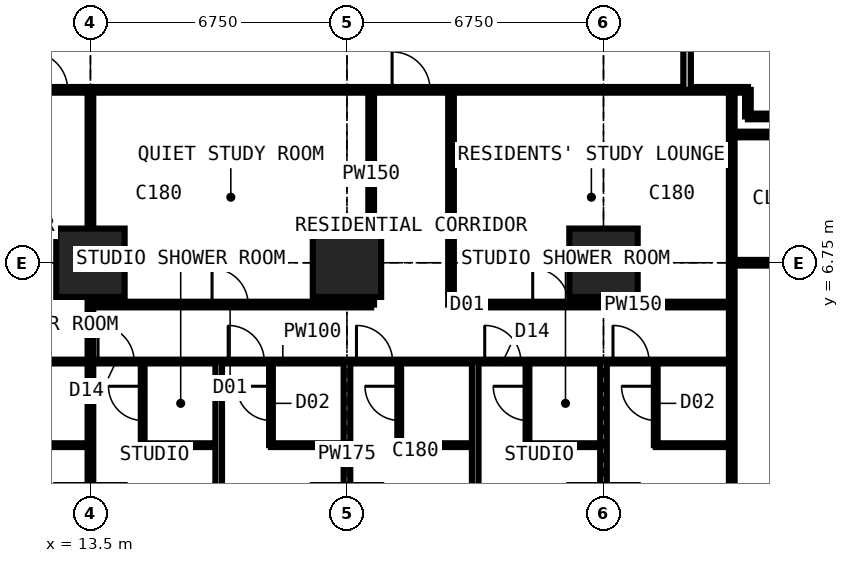
"""IFC4 building model, lengths in metres.
Left out: names, types, materials, properties, quantities, classifications, styles, units other than length and angle.
Written with IfcOpenShell. Run it as: python <this file> out.ifc"""

import sys

from ifc_helpers import new_model, si_unit, direction, frame, frame_2d, origin, origin_2d, place, context, subcontext, project, spatial, rectangle, extrude, element, fill, save


model = new_model("IFC4")
c1 = context("Model", 3, precision=1e-05, world=origin(), true_north=direction((0.0, 1.0)))
c2 = subcontext(c1, "Body", "Model", "MODEL_VIEW")
j1 = project(units=[si_unit("LENGTHUNIT", "METRE"), si_unit("PLANEANGLEUNIT", "RADIAN")], contexts=[c1])
p1 = place(None, origin())
s1 = spatial("IfcSite", under=j1, at=p1, CompositionType="ELEMENT")
p2 = place(p1, origin())
s2 = spatial("IfcBuilding", under=s1, at=p2, CompositionType="ELEMENT")
p3 = place(p2, frame((0.0, 0.0, 105.3)))
s3 = spatial("IfcBuildingStorey", under=s2, at=p3, CompositionType="ELEMENT", Elevation=105.3)
for number, where, z_axis, x_axis in (
    (1, (13.5, 6.75, 0.0), (0.0, 0.0, 1.0), (1.0, 0.0, 0.0)),
    (2, (20.25, 6.75, 0.0), (0.0, 0.0, 1.0), (1.0, 0.0, 0.0)),
    (3, (27.0, 6.75, 0.0), (0.0, 0.0, 1.0), (1.0, 0.0, 0.0)),
):
    element("IfcColumn", number, at=place(p3, frame(where, z_axis=z_axis, x_axis=x_axis)), inside=s3, PredefinedType="COLUMN", context=c2, shape_type="SweptSolid", body=[
        extrude(rectangle(XDim=1.8, YDim=1.8, at=origin_2d()), origin(), (0.0, 0.0, 1.0), 3.6),
    ])
p4 = place(p3, frame((6.75, 4.15, 0.0), z_axis=(0.0, 0.0, 1.0), x_axis=(1.0, 0.0, 0.0)))
e4 = element("IfcWall", 4, at=p4, inside=s3, PredefinedType="PARTITIONING", context=c2, shape_type="SweptSolid", body=[
    extrude(rectangle(XDim=23.625, YDim=0.1, at=frame_2d((11.812, 0.0))), origin(), (0.0, 0.0, 1.0), 3.375),
])
p5 = place(p4, frame((0.2, 0.0, 0.0)))
e5 = element("IfcOpeningElement", 5, at=p5, cuts=e4, PredefinedType="OPENING", context=c2, shape_type="SweptSolid", body=[
    extrude(rectangle(XDim=0.95, YDim=2.2, at=frame_2d((0.475, 1.1))), frame((0.0, 0.06, 0.0), z_axis=(0.0, -1.0, 0.0), x_axis=(1.0, 0.0, 0.0)), (0.0, 0.0, 1.0), 0.12),
])
p6 = place(p4, frame((3.625, 0.0, 0.0)))
e6 = element("IfcOpeningElement", 6, at=p6, cuts=e4, PredefinedType="OPENING", context=c2, shape_type="SweptSolid", body=[
    extrude(rectangle(XDim=0.95, YDim=2.2, at=frame_2d((0.475, 1.1))), frame((0.0, 0.06, 0.0), z_axis=(0.0, -1.0, 0.0), x_axis=(1.0, 0.0, 0.0)), (0.0, 0.0, 1.0), 0.12),
])
p7 = place(p4, frame((6.95, 0.0, 0.0)))
e7 = element("IfcOpeningElement", 7, at=p7, cuts=e4, PredefinedType="OPENING", context=c2, shape_type="SweptSolid", body=[
    extrude(rectangle(XDim=0.95, YDim=2.2, at=frame_2d((0.475, 1.1))), frame((0.0, 0.06, 0.0), z_axis=(0.0, -1.0, 0.0), x_axis=(1.0, 0.0, 0.0)), (0.0, 0.0, 1.0), 0.12),
])
p8 = place(p4, frame((10.375, 0.0, 0.0)))
e8 = element("IfcOpeningElement", 8, at=p8, cuts=e4, PredefinedType="OPENING", context=c2, shape_type="SweptSolid", body=[
    extrude(rectangle(XDim=0.95, YDim=2.2, at=frame_2d((0.475, 1.1))), frame((0.0, 0.06, 0.0), z_axis=(0.0, -1.0, 0.0), x_axis=(1.0, 0.0, 0.0)), (0.0, 0.0, 1.0), 0.12),
])
p9 = place(p4, frame((13.75, 0.0, 0.0)))
e9 = element("IfcOpeningElement", 9, at=p9, cuts=e4, PredefinedType="OPENING", context=c2, shape_type="SweptSolid", body=[
    extrude(rectangle(XDim=0.95, YDim=2.2, at=frame_2d((0.475, 1.1))), frame((0.0, 0.06, 0.0), z_axis=(0.0, -1.0, 0.0), x_axis=(1.0, 0.0, 0.0)), (0.0, 0.0, 1.0), 0.12),
])
p10 = place(p4, frame((17.125, 0.0, 0.0)))
e10 = element("IfcOpeningElement", 10, at=p10, cuts=e4, PredefinedType="OPENING", context=c2, shape_type="SweptSolid", body=[
    extrude(rectangle(XDim=0.95, YDim=2.2, at=frame_2d((0.475, 1.1))), frame((0.0, 0.06, 0.0), z_axis=(0.0, -1.0, 0.0), x_axis=(1.0, 0.0, 0.0)), (0.0, 0.0, 1.0), 0.12),
])
p11 = place(p4, frame((20.5, 0.0, 0.0)))
e11 = element("IfcOpeningElement", 11, at=p11, cuts=e4, PredefinedType="OPENING", context=c2, shape_type="SweptSolid", body=[
    extrude(rectangle(XDim=0.95, YDim=2.2, at=frame_2d((0.475, 1.1))), frame((0.0, 0.06, 0.0), z_axis=(0.0, -1.0, 0.0), x_axis=(1.0, 0.0, 0.0)), (0.0, 0.0, 1.0), 0.12),
])
p12 = place(p3, frame((10.125, 11.3, 0.0), z_axis=(0.0, 0.0, 1.0), x_axis=(1.0, 0.0, 0.0)))
e12 = element("IfcWall", 12, at=p12, inside=s3, PredefinedType="PARTITIONING", context=c2, shape_type="SweptSolid", body=[
    extrude(rectangle(XDim=20.675, YDim=0.15, at=frame_2d((10.337, 0.0))), origin(), (0.0, 0.0, 1.0), 3.375),
])
p13 = place(p12, frame((1.775, 0.0, 0.0)))
e13 = element("IfcOpeningElement", 13, at=p13, cuts=e12, PredefinedType="OPENING", context=c2, shape_type="SweptSolid", body=[
    extrude(rectangle(XDim=1.0, YDim=2.2, at=frame_2d((0.5, 1.1))), frame((0.0, 0.085, 0.0), z_axis=(0.0, -1.0, 0.0), x_axis=(1.0, 0.0, 0.0)), (0.0, 0.0, 1.0), 0.17),
])
p14 = place(p12, frame((11.312, 0.0, 0.0)))
e14 = element("IfcOpeningElement", 14, at=p14, cuts=e12, PredefinedType="OPENING", context=c2, shape_type="SweptSolid", body=[
    extrude(rectangle(XDim=1.0, YDim=2.2, at=frame_2d((0.5, 1.1))), frame((0.0, 0.085, 0.0), z_axis=(0.0, -1.0, 0.0), x_axis=(1.0, 0.0, 0.0)), (0.0, 0.0, 1.0), 0.17),
])
p15 = place(p3, frame((11.5, 1.95, 0.0), z_axis=(0.0, 0.0, 1.0), x_axis=(1.0, 0.0, 0.0)))
e15 = element("IfcWall", 15, at=p15, inside=s3, PredefinedType="PARTITIONING", context=c2, shape_type="SweptSolid", body=[
    extrude(rectangle(XDim=2.0, YDim=0.1, at=frame_2d((1.0, 0.0))), origin(), (0.0, 0.0, 1.0), 3.375),
])
p16 = place(p3, frame((13.5, -0.734, 0.0), z_axis=(0.0, 0.0, 1.0), x_axis=(0.0, 1.0, 0.0)))
e16 = element("IfcWall", 16, at=p16, inside=s3, PredefinedType="PARTITIONING", context=c2, shape_type="SweptSolid", body=[
    extrude(rectangle(XDim=12.034, YDim=0.15, at=frame_2d((6.017, 0.0))), origin(), (0.0, 0.0, 1.0), 2.61),
])
p17 = place(p3, frame((13.5, 5.65, 0.0), z_axis=(0.0, 0.0, 1.0), x_axis=(1.0, 0.0, 0.0)))
e17 = element("IfcWall", 17, at=p17, inside=s3, PredefinedType="PARTITIONING", context=c2, shape_type="SweptSolid", body=[
    extrude(rectangle(XDim=7.387, YDim=0.15, at=frame_2d((3.694, 0.0))), origin(), (0.0, 0.0, 1.0), 3.375),
])
p18 = place(p17, frame((3.2, 0.0, 0.0)))
e18 = element("IfcOpeningElement", 18, at=p18, cuts=e17, PredefinedType="OPENING", context=c2, shape_type="SweptSolid", body=[
    extrude(rectangle(XDim=0.95, YDim=2.2, at=frame_2d((0.475, 1.1))), frame((0.0, 0.085, 0.0), z_axis=(0.0, -1.0, 0.0), x_axis=(1.0, 0.0, 0.0)), (0.0, 0.0, 1.0), 0.17),
])
p19 = place(p3, frame((14.875, 1.95, 0.0), z_axis=(0.0, 0.0, 1.0), x_axis=(0.0, 1.0, 0.0)))
e19 = element("IfcWall", 19, at=p19, inside=s3, PredefinedType="PARTITIONING", context=c2, shape_type="SweptSolid", body=[
    extrude(rectangle(XDim=2.2, YDim=0.1, at=frame_2d((1.1, 0.0))), origin(), (0.0, 0.0, 1.0), 3.375),
])
p20 = place(p19, frame((0.65, 0.0, 0.0)))
e20 = element("IfcOpeningElement", 20, at=p20, cuts=e19, PredefinedType="OPENING", context=c2, shape_type="SweptSolid", body=[
    extrude(rectangle(XDim=0.9, YDim=2.2, at=frame_2d((0.45, 1.1))), frame((0.0, 0.06, 0.0), z_axis=(0.0, -1.0, 0.0), x_axis=(1.0, 0.0, 0.0)), (0.0, 0.0, 1.0), 0.12),
])
p21 = place(p3, frame((14.875, 1.95, 0.0), z_axis=(0.0, 0.0, 1.0), x_axis=(1.0, 0.0, 0.0)))
e21 = element("IfcWall", 21, at=p21, inside=s3, PredefinedType="PARTITIONING", context=c2, shape_type="SweptSolid", body=[
    extrude(rectangle(XDim=2.0, YDim=0.1, at=frame_2d((1.0, 0.0))), origin(), (0.0, 0.0, 1.0), 3.375),
])
p22 = place(p3, frame((16.875, -0.734, 0.0), z_axis=(0.0, 0.0, 1.0), x_axis=(0.0, 1.0, 0.0)))
e22 = element("IfcWall", 22, at=p22, inside=s3, PredefinedType="PARTITIONING", context=c2, shape_type="SweptSolid", body=[
    extrude(rectangle(XDim=4.884, YDim=0.175, at=frame_2d((2.442, 0.0))), origin(), (0.0, 0.0, 1.0), 3.375),
])
p23 = place(p3, frame((18.25, 1.95, 0.0), z_axis=(0.0, 0.0, 1.0), x_axis=(0.0, 1.0, 0.0)))
e23 = element("IfcWall", 23, at=p23, inside=s3, PredefinedType="PARTITIONING", context=c2, shape_type="SweptSolid", body=[
    extrude(rectangle(XDim=2.2, YDim=0.1, at=frame_2d((1.1, 0.0))), origin(), (0.0, 0.0, 1.0), 3.375),
])
p24 = place(p23, frame((0.65, 0.0, 0.0)))
e24 = element("IfcOpeningElement", 24, at=p24, cuts=e23, PredefinedType="OPENING", context=c2, shape_type="SweptSolid", body=[
    extrude(rectangle(XDim=0.9, YDim=2.2, at=frame_2d((0.45, 1.1))), frame((0.0, 0.06, 0.0), z_axis=(0.0, -1.0, 0.0), x_axis=(1.0, 0.0, 0.0)), (0.0, 0.0, 1.0), 0.12),
])
p25 = place(p3, frame((18.25, 1.95, 0.0), z_axis=(0.0, 0.0, 1.0), x_axis=(1.0, 0.0, 0.0)))
e25 = element("IfcWall", 25, at=p25, inside=s3, PredefinedType="PARTITIONING", context=c2, shape_type="SweptSolid", body=[
    extrude(rectangle(XDim=2.0, YDim=0.1, at=frame_2d((1.0, 0.0))), origin(), (0.0, 0.0, 1.0), 3.375),
])
p26 = place(p3, frame((20.25, -0.734, 0.0), z_axis=(0.0, 0.0, 1.0), x_axis=(0.0, 1.0, 0.0)))
e26 = element("IfcWall", 26, at=p26, inside=s3, PredefinedType="PARTITIONING", context=c2, shape_type="SweptSolid", body=[
    extrude(rectangle(XDim=4.884, YDim=0.175, at=frame_2d((2.442, 0.0))), origin(), (0.0, 0.0, 1.0), 2.61),
])
p27 = place(p3, frame((20.887, 5.65, 0.0), z_axis=(0.0, 0.0, 1.0), x_axis=(0.0, 1.0, 0.0)))
e27 = element("IfcWall", 27, at=p27, inside=s3, PredefinedType="PARTITIONING", context=c2, shape_type="SweptSolid", body=[
    extrude(rectangle(XDim=5.65, YDim=0.15, at=frame_2d((2.825, 0.0))), origin(), (0.0, 0.0, 1.0), 3.375),
])
p28 = place(p3, frame((21.625, 1.95, 0.0), z_axis=(0.0, 0.0, 1.0), x_axis=(0.0, 1.0, 0.0)))
e28 = element("IfcWall", 28, at=p28, inside=s3, PredefinedType="PARTITIONING", context=c2, shape_type="SweptSolid", body=[
    extrude(rectangle(XDim=2.2, YDim=0.1, at=frame_2d((1.1, 0.0))), origin(), (0.0, 0.0, 1.0), 3.375),
])
p29 = place(p28, frame((0.65, 0.0, 0.0)))
e29 = element("IfcOpeningElement", 29, at=p29, cuts=e28, PredefinedType="OPENING", context=c2, shape_type="SweptSolid", body=[
    extrude(rectangle(XDim=0.9, YDim=2.2, at=frame_2d((0.45, 1.1))), frame((0.0, 0.06, 0.0), z_axis=(0.0, -1.0, 0.0), x_axis=(1.0, 0.0, 0.0)), (0.0, 0.0, 1.0), 0.12),
])
p30 = place(p3, frame((21.625, 1.95, 0.0), z_axis=(0.0, 0.0, 1.0), x_axis=(1.0, 0.0, 0.0)))
e30 = element("IfcWall", 30, at=p30, inside=s3, PredefinedType="PARTITIONING", context=c2, shape_type="SweptSolid", body=[
    extrude(rectangle(XDim=2.0, YDim=0.1, at=frame_2d((1.0, 0.0))), origin(), (0.0, 0.0, 1.0), 3.375),
])
p31 = place(p3, frame((22.988, 5.65, 0.0), z_axis=(0.0, 0.0, 1.0), x_axis=(1.0, 0.0, 0.0)))
e31 = element("IfcWall", 31, at=p31, inside=s3, PredefinedType="PARTITIONING", context=c2, shape_type="SweptSolid", body=[
    extrude(rectangle(XDim=7.387, YDim=0.15, at=frame_2d((3.694, 0.0))), origin(), (0.0, 0.0, 1.0), 3.375),
])
p32 = place(p31, frame((2.15, 0.0, 0.0)))
e32 = element("IfcOpeningElement", 32, at=p32, cuts=e31, PredefinedType="OPENING", context=c2, shape_type="SweptSolid", body=[
    extrude(rectangle(XDim=0.95, YDim=2.2, at=frame_2d((0.475, 1.1))), frame((0.0, 0.085, 0.0), z_axis=(0.0, -1.0, 0.0), x_axis=(1.0, 0.0, 0.0)), (0.0, 0.0, 1.0), 0.17),
])
p33 = place(p3, frame((22.988, 5.65, 0.0), z_axis=(0.0, 0.0, 1.0), x_axis=(0.0, 1.0, 0.0)))
e33 = element("IfcWall", 33, at=p33, inside=s3, PredefinedType="PARTITIONING", context=c2, shape_type="SweptSolid", body=[
    extrude(rectangle(XDim=5.65, YDim=0.15, at=frame_2d((2.825, 0.0))), origin(), (0.0, 0.0, 1.0), 3.375),
])
p34 = place(p3, frame((23.625, -0.734, 0.0), z_axis=(0.0, 0.0, 1.0), x_axis=(0.0, 1.0, 0.0)))
e34 = element("IfcWall", 34, at=p34, inside=s3, PredefinedType="PARTITIONING", context=c2, shape_type="SweptSolid", body=[
    extrude(rectangle(XDim=4.884, YDim=0.175, at=frame_2d((2.442, 0.0))), origin(), (0.0, 0.0, 1.0), 3.375),
])
p35 = place(p3, frame((25.0, 1.95, 0.0), z_axis=(0.0, 0.0, 1.0), x_axis=(0.0, 1.0, 0.0)))
e35 = element("IfcWall", 35, at=p35, inside=s3, PredefinedType="PARTITIONING", context=c2, shape_type="SweptSolid", body=[
    extrude(rectangle(XDim=2.2, YDim=0.1, at=frame_2d((1.1, 0.0))), origin(), (0.0, 0.0, 1.0), 3.375),
])
p36 = place(p35, frame((0.65, 0.0, 0.0)))
e36 = element("IfcOpeningElement", 36, at=p36, cuts=e35, PredefinedType="OPENING", context=c2, shape_type="SweptSolid", body=[
    extrude(rectangle(XDim=0.9, YDim=2.2, at=frame_2d((0.45, 1.1))), frame((0.0, 0.06, 0.0), z_axis=(0.0, -1.0, 0.0), x_axis=(1.0, 0.0, 0.0)), (0.0, 0.0, 1.0), 0.12),
])
p37 = place(p3, frame((25.0, 1.95, 0.0), z_axis=(0.0, 0.0, 1.0), x_axis=(1.0, 0.0, 0.0)))
e37 = element("IfcWall", 37, at=p37, inside=s3, PredefinedType="PARTITIONING", context=c2, shape_type="SweptSolid", body=[
    extrude(rectangle(XDim=2.0, YDim=0.1, at=frame_2d((1.0, 0.0))), origin(), (0.0, 0.0, 1.0), 3.375),
])
p38 = place(p3, frame((27.0, -0.734, 0.0), z_axis=(0.0, 0.0, 1.0), x_axis=(0.0, 1.0, 0.0)))
e38 = element("IfcWall", 38, at=p38, inside=s3, PredefinedType="PARTITIONING", context=c2, shape_type="SweptSolid", body=[
    extrude(rectangle(XDim=4.884, YDim=0.175, at=frame_2d((2.442, 0.0))), origin(), (0.0, 0.0, 1.0), 2.61),
])
p39 = place(p3, frame((28.375, 1.95, 0.0), z_axis=(0.0, 0.0, 1.0), x_axis=(0.0, 1.0, 0.0)))
e39 = element("IfcWall", 39, at=p39, inside=s3, PredefinedType="PARTITIONING", context=c2, shape_type="SweptSolid", body=[
    extrude(rectangle(XDim=2.2, YDim=0.1, at=frame_2d((1.1, 0.0))), origin(), (0.0, 0.0, 1.0), 3.375),
])
p40 = place(p39, frame((0.65, 0.0, 0.0)))
e40 = element("IfcOpeningElement", 40, at=p40, cuts=e39, PredefinedType="OPENING", context=c2, shape_type="SweptSolid", body=[
    extrude(rectangle(XDim=0.9, YDim=2.2, at=frame_2d((0.45, 1.1))), frame((0.0, 0.06, 0.0), z_axis=(0.0, -1.0, 0.0), x_axis=(1.0, 0.0, 0.0)), (0.0, 0.0, 1.0), 0.12),
])
p41 = place(p3, frame((28.375, 1.95, 0.0), z_axis=(0.0, 0.0, 1.0), x_axis=(1.0, 0.0, 0.0)))
e41 = element("IfcWall", 41, at=p41, inside=s3, PredefinedType="PARTITIONING", context=c2, shape_type="SweptSolid", body=[
    extrude(rectangle(XDim=2.0, YDim=0.1, at=frame_2d((1.0, 0.0))), origin(), (0.0, 0.0, 1.0), 3.375),
])
p42 = place(p3, frame((29.2, 11.3, 0.0), z_axis=(0.0, 0.0, 1.0), x_axis=(0.0, 1.0, 0.0)))
e42 = element("IfcWall", 42, at=p42, inside=s3, PredefinedType="PARTITIONING", context=c2, shape_type="SweptSolid", body=[
    extrude(rectangle(XDim=17.9, YDim=0.2, at=frame_2d((8.95, 0.0))), origin(), (0.0, 0.0, 1.0), 3.375),
])
p43 = place(p42, frame((8.35, 0.0, 0.0)))
e43 = element("IfcOpeningElement", 43, at=p43, cuts=e42, PredefinedType="OPENING", context=c2, shape_type="SweptSolid", body=[
    extrude(rectangle(XDim=1.2, YDim=2.2, at=frame_2d((0.6, 1.1))), frame((0.0, 0.11, 0.0), z_axis=(0.0, -1.0, 0.0), x_axis=(1.0, 0.0, 0.0)), (0.0, 0.0, 1.0), 0.22),
])
p44 = place(p3, frame((30.375, -0.734, 0.0), z_axis=(0.0, 0.0, 1.0), x_axis=(0.0, 1.0, 0.0)))
e44 = element("IfcWall", 44, at=p44, inside=s3, PredefinedType="PARTITIONING", context=c2, shape_type="SweptSolid", body=[
    extrude(rectangle(XDim=12.034, YDim=0.15, at=frame_2d((6.017, 0.0))), origin(), (0.0, 0.0, 1.0), 3.375),
])
p45 = place(p3, frame((30.375, 6.75, 0.0), z_axis=(0.0, 0.0, 1.0), x_axis=(1.0, 0.0, 0.0)))
e45 = element("IfcWall", 45, at=p45, inside=s3, PredefinedType="PARTITIONING", context=c2, shape_type="SweptSolid", body=[
    extrude(rectangle(XDim=10.859, YDim=0.15, at=frame_2d((5.429, 0.0))), origin(), (0.0, 0.0, 1.0), 2.877),
])
p46 = place(p45, frame((1.45, 0.0, 0.0)))
e46 = element("IfcOpeningElement", 46, at=p46, cuts=e45, PredefinedType="OPENING", context=c2, shape_type="SweptSolid", body=[
    extrude(rectangle(XDim=1.0, YDim=2.2, at=frame_2d((0.5, 1.1))), frame((0.0, 0.085, 0.0), z_axis=(0.0, -1.0, 0.0), x_axis=(1.0, 0.0, 0.0)), (0.0, 0.0, 1.0), 0.17),
])
p47 = place(p3, frame((30.375, 10.125, 0.0), z_axis=(0.0, 0.0, 1.0), x_axis=(1.0, 0.0, 0.0)))
e47 = element("IfcWall", 47, at=p47, inside=s3, PredefinedType="PARTITIONING", context=c2, shape_type="SweptSolid", body=[
    extrude(rectangle(XDim=10.859, YDim=0.15, at=frame_2d((5.429, 0.0))), origin(), (0.0, 0.0, 1.0), 3.375),
])
p48 = place(p47, frame((2.5, 0.0, 0.0)))
e48 = element("IfcOpeningElement", 48, at=p48, cuts=e47, PredefinedType="OPENING", context=c2, shape_type="SweptSolid", body=[
    extrude(rectangle(XDim=1.0, YDim=2.2, at=frame_2d((0.5, 1.1))), frame((0.0, 0.085, 0.0), z_axis=(0.0, -1.0, 0.0), x_axis=(1.0, 0.0, 0.0)), (0.0, 0.0, 1.0), 0.17),
])
p49 = place(p3, frame((30.8, 10.6, 0.0), z_axis=(0.0, 0.0, 1.0), x_axis=(0.0, 1.0, 0.0)))
e49 = element("IfcWall", 49, at=p49, inside=s3, PredefinedType="PARTITIONING", context=c2, shape_type="SweptSolid", body=[
    extrude(rectangle(XDim=0.7, YDim=0.15, at=frame_2d((0.35, 0.0))), origin(), (0.0, 0.0, 1.0), 3.375),
])
p50 = place(p3, frame((30.8, 10.6, 0.0), z_axis=(0.0, 0.0, 1.0), x_axis=(1.0, 0.0, 0.0)))
e50 = element("IfcWall", 50, at=p50, inside=s3, PredefinedType="PARTITIONING", context=c2, shape_type="SweptSolid", body=[
    extrude(rectangle(XDim=1.85, YDim=0.15, at=frame_2d((0.925, 0.0))), origin(), (0.0, 0.0, 1.0), 3.375),
])
p51 = place(p13, origin())
e51 = element("IfcDoor", 51, at=p51, inside=s3, OperationType="SINGLE_SWING_LEFT", PredefinedType="DOOR", context=c2, shape_type="SweptSolid", body=[
    extrude(rectangle(XDim=1.0, YDim=2.2, at=frame_2d((0.5, 1.1))), frame((0.0, 0.025, 0.0), z_axis=(0.0, -1.0, 0.0), x_axis=(1.0, 0.0, 0.0)), (0.0, 0.0, 1.0), 0.05),
])
fill(e13, e51)
p52 = place(p7, origin())
e52 = element("IfcDoor", 52, at=p52, inside=s3, OperationType="SINGLE_SWING_LEFT", PredefinedType="DOOR", context=c2, shape_type="SweptSolid", body=[
    extrude(rectangle(XDim=0.95, YDim=2.2, at=frame_2d((0.475, 1.1))), frame((0.0, 0.025, 0.0), z_axis=(0.0, -1.0, 0.0), x_axis=(1.0, 0.0, 0.0)), (0.0, 0.0, 1.0), 0.05),
])
fill(e7, e52)
p53 = place(p20, origin())
e53 = element("IfcDoor", 53, at=p53, inside=s3, OperationType="SINGLE_SWING_RIGHT", PredefinedType="DOOR", context=c2, shape_type="SweptSolid", body=[
    extrude(rectangle(XDim=0.9, YDim=2.2, at=frame_2d((0.45, 1.1))), frame((0.0, 0.025, 0.0), z_axis=(0.0, -1.0, 0.0), x_axis=(1.0, 0.0, 0.0)), (0.0, 0.0, 1.0), 0.05),
])
fill(e20, e53)
p54 = place(p8, origin())
e54 = element("IfcDoor", 54, at=p54, inside=s3, OperationType="SINGLE_SWING_LEFT", PredefinedType="DOOR", context=c2, shape_type="SweptSolid", body=[
    extrude(rectangle(XDim=0.95, YDim=2.2, at=frame_2d((0.475, 1.1))), frame((0.0, 0.025, 0.0), z_axis=(0.0, -1.0, 0.0), x_axis=(1.0, 0.0, 0.0)), (0.0, 0.0, 1.0), 0.05),
])
fill(e8, e54)
p55 = place(p24, origin())
e55 = element("IfcDoor", 55, at=p55, inside=s3, OperationType="SINGLE_SWING_RIGHT", PredefinedType="DOOR", context=c2, shape_type="SweptSolid", body=[
    extrude(rectangle(XDim=0.9, YDim=2.2, at=frame_2d((0.45, 1.1))), frame((0.0, 0.025, 0.0), z_axis=(0.0, -1.0, 0.0), x_axis=(1.0, 0.0, 0.0)), (0.0, 0.0, 1.0), 0.05),
])
fill(e24, e55)
p56 = place(p9, origin())
e56 = element("IfcDoor", 56, at=p56, inside=s3, OperationType="SINGLE_SWING_LEFT", PredefinedType="DOOR", context=c2, shape_type="SweptSolid", body=[
    extrude(rectangle(XDim=0.95, YDim=2.2, at=frame_2d((0.475, 1.1))), frame((0.0, 0.025, 0.0), z_axis=(0.0, -1.0, 0.0), x_axis=(1.0, 0.0, 0.0)), (0.0, 0.0, 1.0), 0.05),
])
fill(e9, e56)
p57 = place(p29, origin())
e57 = element("IfcDoor", 57, at=p57, inside=s3, OperationType="SINGLE_SWING_RIGHT", PredefinedType="DOOR", context=c2, shape_type="SweptSolid", body=[
    extrude(rectangle(XDim=0.9, YDim=2.2, at=frame_2d((0.45, 1.1))), frame((0.0, 0.025, 0.0), z_axis=(0.0, -1.0, 0.0), x_axis=(1.0, 0.0, 0.0)), (0.0, 0.0, 1.0), 0.05),
])
fill(e29, e57)
p58 = place(p10, origin())
e58 = element("IfcDoor", 58, at=p58, inside=s3, OperationType="SINGLE_SWING_LEFT", PredefinedType="DOOR", context=c2, shape_type="SweptSolid", body=[
    extrude(rectangle(XDim=0.95, YDim=2.2, at=frame_2d((0.475, 1.1))), frame((0.0, 0.025, 0.0), z_axis=(0.0, -1.0, 0.0), x_axis=(1.0, 0.0, 0.0)), (0.0, 0.0, 1.0), 0.05),
])
fill(e10, e58)
p59 = place(p36, origin())
e59 = element("IfcDoor", 59, at=p59, inside=s3, OperationType="SINGLE_SWING_RIGHT", PredefinedType="DOOR", context=c2, shape_type="SweptSolid", body=[
    extrude(rectangle(XDim=0.9, YDim=2.2, at=frame_2d((0.45, 1.1))), frame((0.0, 0.025, 0.0), z_axis=(0.0, -1.0, 0.0), x_axis=(1.0, 0.0, 0.0)), (0.0, 0.0, 1.0), 0.05),
])
fill(e36, e59)
p60 = place(p11, origin())
e60 = element("IfcDoor", 60, at=p60, inside=s3, OperationType="SINGLE_SWING_LEFT", PredefinedType="DOOR", context=c2, shape_type="SweptSolid", body=[
    extrude(rectangle(XDim=0.95, YDim=2.2, at=frame_2d((0.475, 1.1))), frame((0.0, 0.025, 0.0), z_axis=(0.0, -1.0, 0.0), x_axis=(1.0, 0.0, 0.0)), (0.0, 0.0, 1.0), 0.05),
])
fill(e11, e60)
p61 = place(p40, origin())
e61 = element("IfcDoor", 61, at=p61, inside=s3, OperationType="SINGLE_SWING_RIGHT", PredefinedType="DOOR", context=c2, shape_type="SweptSolid", body=[
    extrude(rectangle(XDim=0.9, YDim=2.2, at=frame_2d((0.45, 1.1))), frame((0.0, 0.025, 0.0), z_axis=(0.0, -1.0, 0.0), x_axis=(1.0, 0.0, 0.0)), (0.0, 0.0, 1.0), 0.05),
])
fill(e40, e61)
p62 = place(p14, origin())
e62 = element("IfcDoor", 62, at=p62, inside=s3, OperationType="SINGLE_SWING_LEFT", PredefinedType="DOOR", context=c2, shape_type="SweptSolid", body=[
    extrude(rectangle(XDim=1.0, YDim=2.2, at=frame_2d((0.5, 1.1))), frame((0.0, 0.025, 0.0), z_axis=(0.0, -1.0, 0.0), x_axis=(1.0, 0.0, 0.0)), (0.0, 0.0, 1.0), 0.05),
])
fill(e14, e62)
p63 = place(p32, origin())
e63 = element("IfcDoor", 63, at=p63, inside=s3, OperationType="SINGLE_SWING_LEFT", PredefinedType="DOOR", context=c2, shape_type="SweptSolid", body=[
    extrude(rectangle(XDim=0.95, YDim=2.2, at=frame_2d((0.475, 1.1))), frame((0.0, 0.025, 0.0), z_axis=(0.0, -1.0, 0.0), x_axis=(1.0, 0.0, 0.0)), (0.0, 0.0, 1.0), 0.05),
])
fill(e32, e63)
p64 = place(p18, origin())
e64 = element("IfcDoor", 64, at=p64, inside=s3, OperationType="SINGLE_SWING_LEFT", PredefinedType="DOOR", context=c2, shape_type="SweptSolid", body=[
    extrude(rectangle(XDim=0.95, YDim=2.2, at=frame_2d((0.475, 1.1))), frame((0.0, 0.025, 0.0), z_axis=(0.0, -1.0, 0.0), x_axis=(1.0, 0.0, 0.0)), (0.0, 0.0, 1.0), 0.05),
])
fill(e18, e64)
save(model, sys.argv[1])
